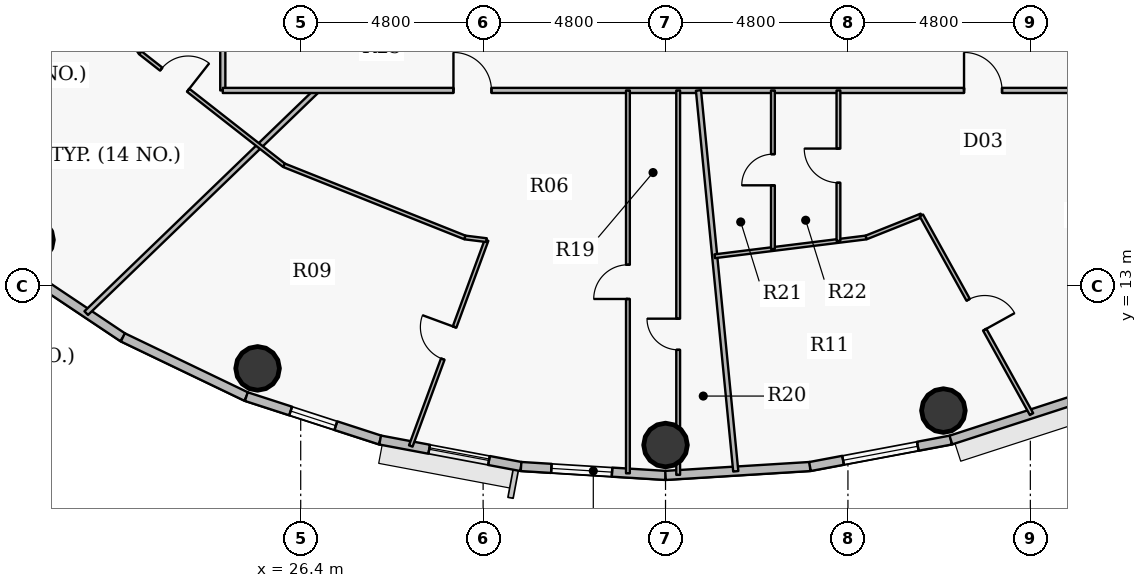
"""IFC4 building model, lengths in metres.
Left out: names, types, materials, properties, quantities, classifications, styles, units other than length and angle.
Written with IfcOpenShell. Run it as: python <this file> out.ifc"""

import sys

from ifc_helpers import new_model, si_unit, direction, frame, frame_2d, origin, origin_2d, place, context, subcontext, project, spatial, rectangle, hollow_circle, extrude, source, transform, mapped, element, fill, save


model = new_model("IFC4")
c1 = context("Model", 3, precision=1e-05, world=origin(), true_north=direction((0.0, 1.0)))
c2 = subcontext(c1, "Body", "Model", "MODEL_VIEW")
j1 = project(units=[si_unit("LENGTHUNIT", "METRE"), si_unit("PLANEANGLEUNIT", "RADIAN")], contexts=[c1])
p1 = place(None, origin())
s1 = spatial("IfcSite", under=j1, at=p1, CompositionType="ELEMENT")
p2 = place(p1, origin())
s2 = spatial("IfcBuilding", under=s1, at=p2, CompositionType="ELEMENT")
p3 = place(p2, frame((0.0, 0.0, 255.3)))
s3 = spatial("IfcBuildingStorey", under=s2, at=p3, CompositionType="ELEMENT", Elevation=255.3)
for number, where, z_axis, x_axis in (
    (1, (19.317, 14.219, 0.0), (0.0, 0.0, 1.0), (1.0, 0.0, 0.0)),
    (2, (25.265, 10.836, 0.0), (0.0, 0.0, 1.0), (1.0, 0.0, 0.0)),
    (3, (36.0, 8.82, 0.0), (0.0, 0.0, 1.0), (1.0, 0.0, 0.0)),
    (4, (43.312, 9.727, 0.0), (0.0, 0.0, 1.0), (1.0, 0.0, 0.0)),
):
    element("IfcColumn", number, at=place(p3, frame(where, z_axis=z_axis, x_axis=x_axis)), inside=s3, PredefinedType="COLUMN", context=c2, shape_type="SweptSolid", body=[
        extrude(hollow_circle(Radius=0.575, WallThickness=0.036, at=origin_2d()), origin(), (0.0, 0.0, 1.0), 3.75),
    ])
p4 = place(p3, frame((21.72, 11.652, 0.0), z_axis=(0.0, 0.0, 1.0), x_axis=(-0.831262496074, 0.555880079352, 0.0)))
e5 = element("IfcWall", 5, at=p4, inside=s3, PredefinedType="SOLIDWALL", context=c2, shape_type="SweptSolid", body=[
    extrude(rectangle(XDim=3.484, YDim=0.24, at=frame_2d((1.742, 0.0))), origin(), (0.0, 0.0, 1.0), 3.5),
])
p5 = place(p3, frame((24.969, 10.094, 0.0), z_axis=(0.0, 0.0, 1.0), x_axis=(-0.901598104751, 0.432574684313, 0.0)))
e6 = element("IfcWall", 6, at=p5, inside=s3, PredefinedType="SOLIDWALL", context=c2, shape_type="SweptSolid", body=[
    extrude(rectangle(XDim=3.604, YDim=0.24, at=frame_2d((1.802, 0.0))), origin(), (0.0, 0.0, 1.0), 3.5),
])
p6 = place(p3, frame((28.491, 8.951, 0.0), z_axis=(0.0, 0.0, 1.0), x_axis=(-0.951210789182, 0.308541787354, 0.0)))
e7 = element("IfcWall", 7, at=p6, inside=s3, PredefinedType="SOLIDWALL", context=c2, shape_type="SweptSolid", body=[
    extrude(rectangle(XDim=3.702, YDim=0.24, at=frame_2d((1.851, 0.0))), origin(), (0.0, 0.0, 1.0), 3.5),
])
p7 = place(p6, frame((1.226, 0.0, 0.9)))
e8 = element("IfcOpeningElement", 8, at=p7, cuts=e7, PredefinedType="OPENING", context=c2, shape_type="SweptSolid", body=[
    extrude(rectangle(XDim=1.25, YDim=1.65, at=origin_2d()), frame((0.625, 0.13, 0.825), z_axis=(0.0, -1.0, 0.0), x_axis=(1.0, 0.0, 0.0)), (0.0, 0.0, 1.0), 0.26),
])
p8 = place(p3, frame((32.198, 8.254, 0.0), z_axis=(0.0, 0.0, 1.0), x_axis=(-0.982784898575, 0.184753465822, 0.0)))
e9 = element("IfcWall", 9, at=p8, inside=s3, PredefinedType="SOLIDWALL", context=c2, shape_type="SweptSolid", body=[
    extrude(rectangle(XDim=3.773, YDim=0.24, at=frame_2d((1.886, 0.0))), origin(), (0.0, 0.0, 1.0), 3.5),
])
p9 = place(p8, frame((0.859, 0.0, 0.9)))
e10 = element("IfcOpeningElement", 10, at=p9, cuts=e9, PredefinedType="OPENING", context=c2, shape_type="SweptSolid", body=[
    extrude(rectangle(XDim=1.6, YDim=1.75, at=origin_2d()), frame((0.8, 0.13, 0.875), z_axis=(0.0, -1.0, 0.0), x_axis=(1.0, 0.0, 0.0)), (0.0, 0.0, 1.0), 0.26),
])
p10 = place(p3, frame((36.0, 8.02, 0.0), z_axis=(0.0, 0.0, 1.0), x_axis=(-0.998108785312, 0.06147237333, 0.0)))
e11 = element("IfcWall", 11, at=p10, inside=s3, PredefinedType="SOLIDWALL", context=c2, shape_type="SweptSolid", body=[
    extrude(rectangle(XDim=3.809, YDim=0.24, at=frame_2d((1.904, 0.0))), origin(), (0.0, 0.0, 1.0), 3.5),
])
p11 = place(p10, frame((1.41, 0.0, 0.9)))
e12 = element("IfcOpeningElement", 12, at=p11, cuts=e11, PredefinedType="OPENING", context=c2, shape_type="SweptSolid", body=[
    extrude(rectangle(XDim=1.6, YDim=1.75, at=origin_2d()), frame((0.8, 0.13, 0.875), z_axis=(0.0, -1.0, 0.0), x_axis=(1.0, 0.0, 0.0)), (0.0, 0.0, 1.0), 0.26),
])
p12 = place(p3, frame((39.802, 8.254, 0.0), z_axis=(0.0, 0.0, 1.0), x_axis=(-0.998108785312, -0.06147237333, 0.0)))
e13 = element("IfcWall", 13, at=p12, inside=s3, PredefinedType="SOLIDWALL", context=c2, shape_type="SweptSolid", body=[
    extrude(rectangle(XDim=3.809, YDim=0.24, at=frame_2d((1.904, 0.0))), origin(), (0.0, 0.0, 1.0), 3.5),
])
p13 = place(p3, frame((43.509, 8.951, 0.0), z_axis=(0.0, 0.0, 1.0), x_axis=(-0.982784898575, -0.184753465822, 0.0)))
e14 = element("IfcWall", 14, at=p13, inside=s3, PredefinedType="SOLIDWALL", context=c2, shape_type="SweptSolid", body=[
    extrude(rectangle(XDim=3.773, YDim=0.24, at=frame_2d((1.886, 0.0))), origin(), (0.0, 0.0, 1.0), 3.5),
])
p14 = place(p13, frame((0.886, 0.0, 0.9)))
e15 = element("IfcOpeningElement", 15, at=p14, cuts=e14, PredefinedType="OPENING", context=c2, shape_type="SweptSolid", body=[
    extrude(rectangle(XDim=2.0, YDim=1.75, at=origin_2d()), frame((1.0, 0.13, 0.875), z_axis=(0.0, -1.0, 0.0), x_axis=(1.0, 0.0, 0.0)), (0.0, 0.0, 1.0), 0.26),
])
p15 = place(p3, frame((47.031, 10.094, 0.0), z_axis=(0.0, 0.0, 1.0), x_axis=(-0.951210789182, -0.308541787354, 0.0)))
e16 = element("IfcWall", 16, at=p15, inside=s3, PredefinedType="SOLIDWALL", context=c2, shape_type="SweptSolid", body=[
    extrude(rectangle(XDim=3.702, YDim=0.24, at=frame_2d((1.851, 0.0))), origin(), (0.0, 0.0, 1.0), 3.5),
])
p16 = place(p3, frame((20.756, 12.291, 0.0), z_axis=(0.0, 0.0, 1.0), x_axis=(0.719623273788, 0.694364705196, 0.0)))
e17 = element("IfcWall", 17, at=p16, inside=s3, PredefinedType="PARTITIONING", context=c2, shape_type="SweptSolid", body=[
    extrude(rectangle(XDim=8.438, YDim=0.135, at=frame_2d((4.219, 0.0))), origin(), (0.0, 0.0, 1.0), 2.985),
])
p17 = place(p3, frame((21.856, 19.641, 0.0), z_axis=(0.0, 0.0, 1.0), x_axis=(0.545246536912, -0.838275738636, 0.0)))
e18 = element("IfcWall", 18, at=p17, inside=s3, PredefinedType="PARTITIONING", context=c2, shape_type="SweptSolid", body=[
    extrude(rectangle(XDim=0.598, YDim=0.1, at=frame_2d((0.299, 0.0))), origin(), (0.0, 0.0, 1.0), 3.5),
])
p18 = place(p3, frame((22.182, 19.139, 0.0), z_axis=(0.0, 0.0, 1.0), x_axis=(0.787386902975, -0.616459134917, 0.0)))
e19 = element("IfcWall", 19, at=p18, inside=s3, PredefinedType="PARTITIONING", context=c2, shape_type="SweptSolid", body=[
    extrude(rectangle(XDim=4.799, YDim=0.1, at=frame_2d((2.399, 0.0))), origin(), (0.0, 0.0, 1.0), 2.935),
])
p19 = place(p18, frame((0.695, 0.0, 0.0)))
e20 = element("IfcOpeningElement", 20, at=p19, cuts=e19, PredefinedType="OPENING", context=c2, shape_type="SweptSolid", body=[
    extrude(rectangle(XDim=0.9, YDim=2.1, at=origin_2d()), frame((0.45, 0.06, 1.05), z_axis=(0.0, -1.0, 0.0), x_axis=(1.0, 0.0, 0.0)), (0.0, 0.0, 1.0), 0.12),
])
p20 = place(p3, frame((24.35, 18.15, 0.0), z_axis=(0.0, 0.0, 1.0), x_axis=(0.0, 1.0, 0.0)))
e21 = element("IfcWall", 21, at=p20, inside=s3, PredefinedType="PARTITIONING", context=c2, shape_type="SweptSolid", body=[
    extrude(rectangle(XDim=6.585, YDim=0.135, at=frame_2d((3.293, 0.0))), origin(), (0.0, 0.0, 1.0), 2.935),
])
p21 = place(p3, frame((24.35, 18.15, 0.0), z_axis=(0.0, 0.0, 1.0), x_axis=(1.0, 0.0, 0.0)))
e22 = element("IfcWall", 22, at=p21, inside=s3, PredefinedType="PARTITIONING", context=c2, shape_type="SweptSolid", body=[
    extrude(rectangle(XDim=23.85, YDim=0.135, at=frame_2d((11.925, 0.0))), origin(), (0.0, 0.0, 1.0), 2.935),
])
p22 = place(p21, frame((6.069, 0.0, 0.0)))
e23 = element("IfcOpeningElement", 23, at=p22, cuts=e22, PredefinedType="OPENING", context=c2, shape_type="SweptSolid", body=[
    extrude(rectangle(XDim=1.0, YDim=2.15, at=origin_2d()), frame((0.5, 0.078, 1.075), z_axis=(0.0, -1.0, 0.0), x_axis=(1.0, 0.0, 0.0)), (0.0, 0.0, 1.0), 0.155),
])
p23 = place(p21, frame((19.505, 0.0, 0.0)))
e24 = element("IfcOpeningElement", 24, at=p23, cuts=e22, PredefinedType="OPENING", context=c2, shape_type="SweptSolid", body=[
    extrude(rectangle(XDim=1.0, YDim=2.15, at=origin_2d()), frame((0.5, 0.078, 1.075), z_axis=(0.0, -1.0, 0.0), x_axis=(1.0, 0.0, 0.0)), (0.0, 0.0, 1.0), 0.155),
])
p24 = place(p3, frame((25.961, 16.181, 0.0), z_axis=(0.0, 0.0, 1.0), x_axis=(0.928801505367, -0.370577608105, 0.0)))
e25 = element("IfcWall", 25, at=p24, inside=s3, PredefinedType="PARTITIONING", context=c2, shape_type="SweptSolid", body=[
    extrude(rectangle(XDim=5.126, YDim=0.1, at=frame_2d((2.563, 0.0))), origin(), (0.0, 0.0, 1.0), 2.935),
])
p25 = place(p3, frame((29.296, 8.795, 0.0), z_axis=(0.0, 0.0, 1.0), x_axis=(0.345568130342, 0.938393663284, 0.0)))
e26 = element("IfcWall", 26, at=p25, inside=s3, PredefinedType="PARTITIONING", context=c2, shape_type="SweptSolid", body=[
    extrude(rectangle(XDim=5.771, YDim=0.1, at=frame_2d((2.886, 0.0))), origin(), (0.0, 0.0, 1.0), 2.985),
])
p26 = place(p25, frame((2.436, 0.0, 0.0)))
e27 = element("IfcOpeningElement", 27, at=p26, cuts=e26, PredefinedType="OPENING", context=c2, shape_type="SweptSolid", body=[
    extrude(rectangle(XDim=0.9, YDim=2.1, at=origin_2d()), frame((0.45, 0.06, 1.05), z_axis=(0.0, -1.0, 0.0), x_axis=(1.0, 0.0, 0.0)), (0.0, 0.0, 1.0), 0.12),
])
p27 = place(p3, frame((30.722, 14.281, 0.0), z_axis=(0.0, 0.0, 1.0), x_axis=(0.992395375367, -0.123091100206, 0.0)))
e28 = element("IfcWall", 28, at=p27, inside=s3, PredefinedType="PARTITIONING", context=c2, shape_type="SweptSolid", body=[
    extrude(rectangle(XDim=0.573, YDim=0.1, at=frame_2d((0.287, 0.0))), origin(), (0.0, 0.0, 1.0), 3.5),
])
p28 = place(p3, frame((35.01, 8.076, 0.0), z_axis=(0.0, 0.0, 1.0), x_axis=(0.0, 1.0, 0.0)))
e29 = element("IfcWall", 29, at=p28, inside=s3, PredefinedType="PARTITIONING", context=c2, shape_type="SweptSolid", body=[
    extrude(rectangle(XDim=10.074, YDim=0.1, at=frame_2d((5.037, 0.0))), origin(), (0.0, 0.0, 1.0), 2.985),
])
p29 = place(p28, frame((4.587, 0.0, 0.0)))
e30 = element("IfcOpeningElement", 30, at=p29, cuts=e29, PredefinedType="OPENING", context=c2, shape_type="SweptSolid", body=[
    extrude(rectangle(XDim=0.9, YDim=2.1, at=origin_2d()), frame((0.45, 0.06, 1.05), z_axis=(0.0, -1.0, 0.0), x_axis=(1.0, 0.0, 0.0)), (0.0, 0.0, 1.0), 0.12),
])
p30 = place(p3, frame((36.333, 8.035, 0.0), z_axis=(0.0, 0.0, 1.0), x_axis=(0.0, 1.0, 0.0)))
e31 = element("IfcWall", 31, at=p30, inside=s3, PredefinedType="PARTITIONING", context=c2, shape_type="SweptSolid", body=[
    extrude(rectangle(XDim=10.115, YDim=0.1, at=frame_2d((5.057, 0.0))), origin(), (0.0, 0.0, 1.0), 3.035),
])
p31 = place(p30, frame((3.289, 0.0, 0.0)))
e32 = element("IfcOpeningElement", 32, at=p31, cuts=e31, PredefinedType="OPENING", context=c2, shape_type="SweptSolid", body=[
    extrude(rectangle(XDim=0.82, YDim=2.1, at=origin_2d()), frame((0.41, 0.06, 1.05), z_axis=(0.0, -1.0, 0.0), x_axis=(1.0, 0.0, 0.0)), (0.0, 0.0, 1.0), 0.12),
])
p32 = place(p3, frame((36.867, 18.15, 0.0), z_axis=(0.0, 0.0, 1.0), x_axis=(0.097472533874, -0.995238215273, 0.0)))
e33 = element("IfcWall", 33, at=p32, inside=s3, PredefinedType="PARTITIONING", context=c2, shape_type="SweptSolid", body=[
    extrude(rectangle(XDim=10.069, YDim=0.135, at=frame_2d((5.034, 0.0))), origin(), (0.0, 0.0, 1.0), 2.985),
])
p33 = place(p3, frame((37.294, 13.787, 0.0), z_axis=(0.0, 0.0, 1.0), x_axis=(0.992396239348, 0.123084134349, 0.0)))
e34 = element("IfcWall", 34, at=p33, inside=s3, PredefinedType="PARTITIONING", context=c2, shape_type="SweptSolid", body=[
    extrude(rectangle(XDim=4.015, YDim=0.1, at=frame_2d((2.007, 0.0))), origin(), (0.0, 0.0, 1.0), 2.935),
])
p34 = place(p3, frame((38.826, 13.977, 0.0), z_axis=(0.0, 0.0, 1.0), x_axis=(0.0, 1.0, 0.0)))
e35 = element("IfcWall", 35, at=p34, inside=s3, PredefinedType="PARTITIONING", context=c2, shape_type="SweptSolid", body=[
    extrude(rectangle(XDim=4.173, YDim=0.1, at=frame_2d((2.086, 0.0))), origin(), (0.0, 0.0, 1.0), 3.035),
])
p35 = place(p34, frame((1.677, 0.0, 0.0)))
e36 = element("IfcOpeningElement", 36, at=p35, cuts=e35, PredefinedType="OPENING", context=c2, shape_type="SweptSolid", body=[
    extrude(rectangle(XDim=0.82, YDim=2.1, at=origin_2d()), frame((0.41, 0.06, 1.05), z_axis=(0.0, -1.0, 0.0), x_axis=(1.0, 0.0, 0.0)), (0.0, 0.0, 1.0), 0.12),
])
p36 = place(p3, frame((40.55, 14.191, 0.0), z_axis=(0.0, 0.0, 1.0), x_axis=(0.0, 1.0, 0.0)))
e37 = element("IfcWall", 37, at=p36, inside=s3, PredefinedType="PARTITIONING", context=c2, shape_type="SweptSolid", body=[
    extrude(rectangle(XDim=3.959, YDim=0.1, at=frame_2d((1.979, 0.0))), origin(), (0.0, 0.0, 1.0), 2.935),
])
p37 = place(p36, frame((1.53, 0.0, 0.0)))
e38 = element("IfcOpeningElement", 38, at=p37, cuts=e37, PredefinedType="OPENING", context=c2, shape_type="SweptSolid", body=[
    extrude(rectangle(XDim=0.9, YDim=2.1, at=origin_2d()), frame((0.45, 0.06, 1.05), z_axis=(0.0, -1.0, 0.0), x_axis=(1.0, 0.0, 0.0)), (0.0, 0.0, 1.0), 0.12),
])
p38 = place(p3, frame((41.278, 14.281, 0.0), z_axis=(0.0, 0.0, 1.0), x_axis=(0.928799036151, 0.370583796792, 0.0)))
e39 = element("IfcWall", 39, at=p38, inside=s3, PredefinedType="PARTITIONING", context=c2, shape_type="SweptSolid", body=[
    extrude(rectangle(XDim=1.565, YDim=0.1, at=frame_2d((0.783, 0.0))), origin(), (0.0, 0.0, 1.0), 2.935),
])
p39 = place(p3, frame((42.732, 14.861, 0.0), z_axis=(0.0, 0.0, 1.0), x_axis=(0.485004680322, -0.874511555136, 0.0)))
e40 = element("IfcWall", 40, at=p39, inside=s3, PredefinedType="PARTITIONING", context=c2, shape_type="SweptSolid", body=[
    extrude(rectangle(XDim=5.977, YDim=0.1, at=frame_2d((2.989, 0.0))), origin(), (0.0, 0.0, 1.0), 2.985),
])
p40 = place(p39, frame((2.539, 0.0, 0.0)))
e41 = element("IfcOpeningElement", 41, at=p40, cuts=e40, PredefinedType="OPENING", context=c2, shape_type="SweptSolid", body=[
    extrude(rectangle(XDim=0.9, YDim=2.1, at=origin_2d()), frame((0.45, 0.06, 1.05), z_axis=(0.0, -1.0, 0.0), x_axis=(1.0, 0.0, 0.0)), (0.0, 0.0, 1.0), 0.12),
])
m1 = source(origin(), c2, "Body", "SweptSolid", [
    extrude(rectangle(XDim=1.6, YDim=1.75, at=origin_2d()), frame((0.8, 0.03, 0.875), z_axis=(0.0, -1.0, 0.0), x_axis=(1.0, 0.0, 0.0)), (0.0, 0.0, 1.0), 0.06),
])
p41 = place(p9, origin())
e42 = element("IfcWindow", 42, at=p41, inside=s3, PartitioningType="DOUBLE_PANEL_VERTICAL", PredefinedType="WINDOW", context=c2, shape_type="MappedRepresentation", body=[
    mapped(m1, transform((0.0, 0.0, 0.0), x_axis=(1.0, 0.0, 0.0), y_axis=(0.0, 1.0, 0.0), z_axis=(0.0, 0.0, 1.0), scale=1.0)),
])
fill(e10, e42)
p42 = place(p11, origin())
e43 = element("IfcWindow", 43, at=p42, inside=s3, PartitioningType="DOUBLE_PANEL_VERTICAL", PredefinedType="WINDOW", context=c2, shape_type="MappedRepresentation", body=[
    mapped(m1, transform((0.0, 0.0, 0.0), x_axis=(1.0, 0.0, 0.0), y_axis=(0.0, 1.0, 0.0), z_axis=(0.0, 0.0, 1.0), scale=1.0)),
])
fill(e12, e43)
m2 = source(origin(), c2, "Body", "SweptSolid", [
    extrude(rectangle(XDim=2.0, YDim=1.75, at=origin_2d()), frame((1.0, 0.03, 0.875), z_axis=(0.0, -1.0, 0.0), x_axis=(1.0, 0.0, 0.0)), (0.0, 0.0, 1.0), 0.06),
])
p43 = place(p14, origin())
e44 = element("IfcWindow", 44, at=p43, inside=s3, PartitioningType="DOUBLE_PANEL_VERTICAL", PredefinedType="WINDOW", context=c2, shape_type="MappedRepresentation", body=[
    mapped(m2, transform((0.0, 0.0, 0.0), x_axis=(1.0, 0.0, 0.0), y_axis=(0.0, 1.0, 0.0), z_axis=(0.0, 0.0, 1.0), scale=1.0)),
])
fill(e15, e44)
m3 = source(origin(), c2, "Body", "SweptSolid", [
    extrude(rectangle(XDim=1.25, YDim=1.65, at=origin_2d()), frame((0.625, 0.03, 0.825), z_axis=(0.0, -1.0, 0.0), x_axis=(1.0, 0.0, 0.0)), (0.0, 0.0, 1.0), 0.06),
])
p44 = place(p7, origin())
e45 = element("IfcWindow", 45, at=p44, inside=s3, PartitioningType="SINGLE_PANEL", PredefinedType="WINDOW", context=c2, shape_type="MappedRepresentation", body=[
    mapped(m3, transform((0.0, 0.0, 0.0), x_axis=(1.0, 0.0, 0.0), y_axis=(0.0, 1.0, 0.0), z_axis=(0.0, 0.0, 1.0), scale=1.0)),
])
fill(e8, e45)
m4 = source(origin(), c2, "Body", "SweptSolid", [
    extrude(rectangle(XDim=0.9, YDim=2.1, at=origin_2d()), frame((0.45, 0.025, 1.05), z_axis=(0.0, -1.0, 0.0), x_axis=(1.0, 0.0, 0.0)), (0.0, 0.0, 1.0), 0.05),
])
p45 = place(p19, origin())
e46 = element("IfcDoor", 46, at=p45, inside=s3, OperationType="SINGLE_SWING_RIGHT", PredefinedType="DOOR", context=c2, shape_type="MappedRepresentation", body=[
    mapped(m4, transform((0.0, 0.0, 0.0), x_axis=(1.0, 0.0, 0.0), y_axis=(0.0, 1.0, 0.0), z_axis=(0.0, 0.0, 1.0), scale=1.0)),
])
fill(e20, e46)
m5 = source(origin(), c2, "Body", "SweptSolid", [
    extrude(rectangle(XDim=1.0, YDim=2.15, at=origin_2d()), frame((0.5, 0.025, 1.075), z_axis=(0.0, -1.0, 0.0), x_axis=(1.0, 0.0, 0.0)), (0.0, 0.0, 1.0), 0.05),
])
p46 = place(p22, origin())
e47 = element("IfcDoor", 47, at=p46, inside=s3, OperationType="SINGLE_SWING_LEFT", PredefinedType="DOOR", context=c2, shape_type="MappedRepresentation", body=[
    mapped(m5, transform((0.0, 0.0, 0.0), x_axis=(1.0, 0.0, 0.0), y_axis=(0.0, 1.0, 0.0), z_axis=(0.0, 0.0, 1.0), scale=1.0)),
])
fill(e23, e47)
p47 = place(p26, origin())
e48 = element("IfcDoor", 48, at=p47, inside=s3, OperationType="SINGLE_SWING_RIGHT", PredefinedType="DOOR", context=c2, shape_type="MappedRepresentation", body=[
    mapped(m4, transform((0.0, 0.0, 0.0), x_axis=(1.0, 0.0, 0.0), y_axis=(0.0, 1.0, 0.0), z_axis=(0.0, 0.0, 1.0), scale=1.0)),
])
fill(e27, e48)
p48 = place(p29, origin())
e49 = element("IfcDoor", 49, at=p48, inside=s3, OperationType="SINGLE_SWING_LEFT", PredefinedType="DOOR", context=c2, shape_type="MappedRepresentation", body=[
    mapped(m4, transform((0.0, 0.0, 0.0), x_axis=(1.0, 0.0, 0.0), y_axis=(0.0, 1.0, 0.0), z_axis=(0.0, 0.0, 1.0), scale=1.0)),
])
fill(e30, e49)
m6 = source(origin(), c2, "Body", "SweptSolid", [
    extrude(rectangle(XDim=0.82, YDim=2.1, at=origin_2d()), frame((0.41, 0.025, 1.05), z_axis=(0.0, -1.0, 0.0), x_axis=(1.0, 0.0, 0.0)), (0.0, 0.0, 1.0), 0.05),
])
p49 = place(p31, origin())
e50 = element("IfcDoor", 50, at=p49, inside=s3, OperationType="SINGLE_SWING_RIGHT", PredefinedType="DOOR", context=c2, shape_type="MappedRepresentation", body=[
    mapped(m6, transform((0.0, 0.0, 0.0), x_axis=(1.0, 0.0, 0.0), y_axis=(0.0, 1.0, 0.0), z_axis=(0.0, 0.0, 1.0), scale=1.0)),
])
fill(e32, e50)
p50 = place(p23, origin())
e51 = element("IfcDoor", 51, at=p50, inside=s3, OperationType="SINGLE_SWING_LEFT", PredefinedType="DOOR", context=c2, shape_type="MappedRepresentation", body=[
    mapped(m5, transform((0.0, 0.0, 0.0), x_axis=(1.0, 0.0, 0.0), y_axis=(0.0, 1.0, 0.0), z_axis=(0.0, 0.0, 1.0), scale=1.0)),
])
fill(e24, e51)
p51 = place(p40, origin())
e52 = element("IfcDoor", 52, at=p51, inside=s3, OperationType="SINGLE_SWING_RIGHT", PredefinedType="DOOR", context=c2, shape_type="MappedRepresentation", body=[
    mapped(m4, transform((0.0, 0.0, 0.0), x_axis=(1.0, 0.0, 0.0), y_axis=(0.0, 1.0, 0.0), z_axis=(0.0, 0.0, 1.0), scale=1.0)),
])
fill(e41, e52)
p52 = place(p37, origin())
e53 = element("IfcDoor", 53, at=p52, inside=s3, OperationType="SINGLE_SWING_RIGHT", PredefinedType="DOOR", context=c2, shape_type="MappedRepresentation", body=[
    mapped(m4, transform((0.0, 0.0, 0.0), x_axis=(1.0, 0.0, 0.0), y_axis=(0.0, 1.0, 0.0), z_axis=(0.0, 0.0, 1.0), scale=1.0)),
])
fill(e38, e53)
p53 = place(p35, origin())
e54 = element("IfcDoor", 54, at=p53, inside=s3, OperationType="SINGLE_SWING_LEFT", PredefinedType="DOOR", context=c2, shape_type="MappedRepresentation", body=[
    mapped(m6, transform((0.0, 0.0, 0.0), x_axis=(1.0, 0.0, 0.0), y_axis=(0.0, 1.0, 0.0), z_axis=(0.0, 0.0, 1.0), scale=1.0)),
])
fill(e36, e54)
save(model, sys.argv[1])
